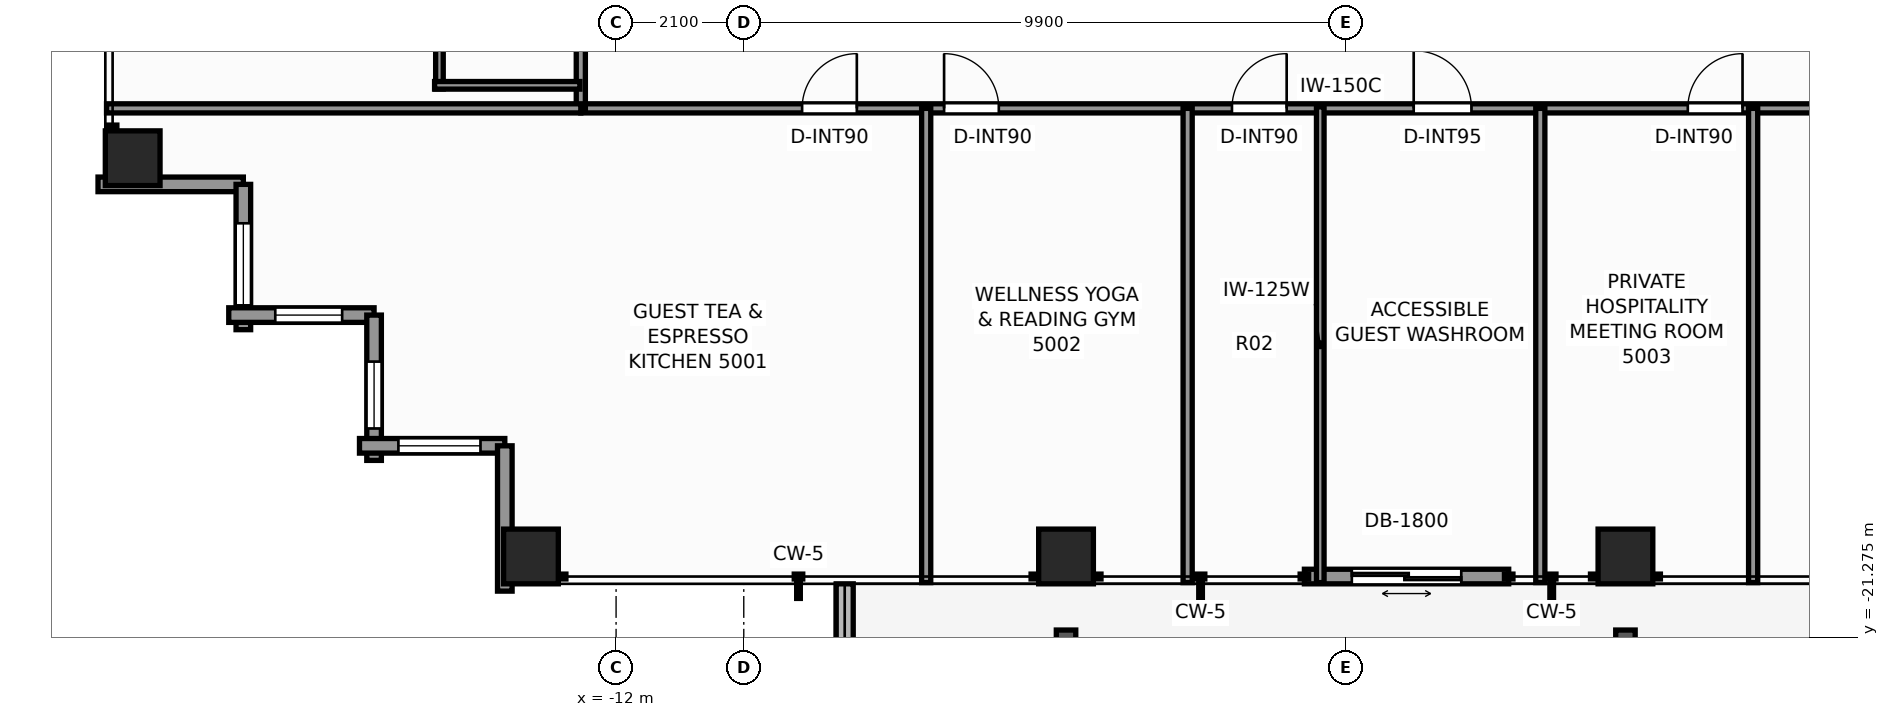
"""IFC4 building model, lengths in metres.
Left out: names, types, materials, properties, quantities, classifications, styles, units other than length and angle.
Written with IfcOpenShell. Run it as: python <this file> out.ifc"""

import sys

from ifc_helpers import new_model, si_unit, direction, frame, frame_2d, origin, origin_2d, place, context, subcontext, project, spatial, rectangle, extrude, element, fill, save


model = new_model("IFC4")
c1 = context("Model", 3, precision=1e-05, world=origin(), true_north=direction((0.0, 1.0)))
c2 = subcontext(c1, "Body", "Model", "MODEL_VIEW")
j1 = project(units=[si_unit("LENGTHUNIT", "METRE"), si_unit("PLANEANGLEUNIT", "RADIAN")], contexts=[c1])
p1 = place(None, origin())
s1 = spatial("IfcSite", under=j1, at=p1, CompositionType="ELEMENT")
p2 = place(p1, origin())
s2 = spatial("IfcBuilding", under=s1, at=p2, CompositionType="ELEMENT")
p3 = place(p2, frame((0.0, 0.0, 173.4)))
s3 = spatial("IfcBuildingStorey", under=s2, at=p3, CompositionType="ELEMENT", Elevation=173.4)
for number, where, z_axis, x_axis in (
    (1, (-13.4, -19.95, 0.0), (0.0, 0.0, 1.0), (1.0, 0.0, 0.0)),
    (2, (-4.6, -19.95, 0.0), (0.0, 0.0, 1.0), (1.0, 0.0, 0.0)),
    (3, (4.6, -19.95, 0.0), (0.0, 0.0, 1.0), (1.0, 0.0, 0.0)),
    (4, (-19.95, -13.4, 0.0), (0.0, 0.0, 1.0), (1.0, 0.0, 0.0)),
):
    element("IfcColumn", number, at=place(p3, frame(where, z_axis=z_axis, x_axis=x_axis)), inside=s3, PredefinedType="COLUMN", context=c2, shape_type="SweptSolid", body=[
        extrude(rectangle(XDim=0.9, YDim=0.9, at=origin_2d()), origin(), (0.0, 0.0, 1.0), 3.3),
    ])
p4 = place(p3, frame((-8.24, -20.4, -0.04), z_axis=(0.0, 0.0, 1.0), x_axis=(0.0, -1.0, 0.0)))
e5 = element("IfcWall", 5, at=p4, inside=s3, PredefinedType="PARAPET", context=c2, shape_type="SweptSolid", body=[
    extrude(rectangle(XDim=3.42, YDim=0.28, at=frame_2d((1.71, 0.0))), origin(), (0.0, 0.0, 1.0), 0.42),
])
p5 = place(p3, frame((2.68, -20.28, 0.0), z_axis=(0.0, 0.0, 1.0), x_axis=(-1.0, 0.0, 0.0)))
e6 = element("IfcWall", 6, at=p5, inside=s3, PredefinedType="STANDARD", context=c2, shape_type="SweptSolid", body=[
    extrude(rectangle(XDim=3.36, YDim=0.24, at=frame_2d((1.68, 0.0))), origin(), (0.0, 0.0, 1.0), 3.08),
])
p6 = place(p5, frame((0.78, 0.0, 0.0)))
e7 = element("IfcOpeningElement", 7, at=p6, cuts=e6, PredefinedType="OPENING", context=c2, shape_type="SweptSolid", body=[
    extrude(rectangle(XDim=1.8, YDim=2.2, at=frame_2d((0.9, 1.1))), frame((0.0, 0.13, 0.0), z_axis=(0.0, -1.0, 0.0), x_axis=(1.0, 0.0, 0.0)), (0.0, 0.0, 1.0), 0.26),
])
p7 = place(p3, frame((-18.13, -13.83, 0.0), z_axis=(0.0, 0.0, 1.0), x_axis=(-1.0, 0.0, 0.0)))
e8 = element("IfcWall", 8, at=p7, inside=s3, PredefinedType="STANDARD", context=c2, shape_type="SweptSolid", body=[
    extrude(rectangle(XDim=2.39, YDim=0.24, at=frame_2d((1.195, 0.0))), origin(), (0.0, 0.0, 1.0), 2.463),
])
p8 = place(p3, frame((-18.13, -16.22, 0.0), z_axis=(0.0, 0.0, 1.0), x_axis=(0.0, 1.0, 0.0)))
e9 = element("IfcWall", 9, at=p8, inside=s3, PredefinedType="STANDARD", context=c2, shape_type="SweptSolid", body=[
    extrude(rectangle(XDim=2.39, YDim=0.24, at=frame_2d((1.195, 0.0))), origin(), (0.0, 0.0, 1.0), 2.463),
])
p9 = place(p8, frame((0.4, 0.0, 0.65)))
e10 = element("IfcOpeningElement", 10, at=p9, cuts=e9, PredefinedType="OPENING", context=c2, shape_type="SweptSolid", body=[
    extrude(rectangle(XDim=1.35, YDim=1.55, at=frame_2d((0.675, 0.775))), frame((0.0, 0.13, 0.0), z_axis=(0.0, -1.0, 0.0), x_axis=(1.0, 0.0, 0.0)), (0.0, 0.0, 1.0), 0.26),
])
p10 = place(p3, frame((-15.98, -15.98, 0.0), z_axis=(0.0, 0.0, 1.0), x_axis=(-1.0, 0.0, 0.0)))
e11 = element("IfcWall", 11, at=p10, inside=s3, PredefinedType="STANDARD", context=c2, shape_type="SweptSolid", body=[
    extrude(rectangle(XDim=2.39, YDim=0.24, at=frame_2d((1.195, 0.0))), origin(), (0.0, 0.0, 1.0), 2.463),
])
p11 = place(p10, frame((0.525, 0.0, 0.65)))
e12 = element("IfcOpeningElement", 12, at=p11, cuts=e11, PredefinedType="OPENING", context=c2, shape_type="SweptSolid", body=[
    extrude(rectangle(XDim=1.1, YDim=1.45, at=frame_2d((0.55, 0.725))), frame((0.0, 0.13, 0.0), z_axis=(0.0, -1.0, 0.0), x_axis=(1.0, 0.0, 0.0)), (0.0, 0.0, 1.0), 0.26),
])
p12 = place(p3, frame((-15.98, -18.37, 0.0), z_axis=(0.0, 0.0, 1.0), x_axis=(0.0, 1.0, 0.0)))
e13 = element("IfcWall", 13, at=p12, inside=s3, PredefinedType="STANDARD", context=c2, shape_type="SweptSolid", body=[
    extrude(rectangle(XDim=2.39, YDim=0.24, at=frame_2d((1.195, 0.0))), origin(), (0.0, 0.0, 1.0), 2.463),
])
p13 = place(p12, frame((0.525, 0.0, 0.65)))
e14 = element("IfcOpeningElement", 14, at=p13, cuts=e13, PredefinedType="OPENING", context=c2, shape_type="SweptSolid", body=[
    extrude(rectangle(XDim=1.1, YDim=1.45, at=frame_2d((0.55, 0.725))), frame((0.0, 0.13, 0.0), z_axis=(0.0, -1.0, 0.0), x_axis=(1.0, 0.0, 0.0)), (0.0, 0.0, 1.0), 0.26),
])
p14 = place(p3, frame((-13.83, -18.13, 0.0), z_axis=(0.0, 0.0, 1.0), x_axis=(-1.0, 0.0, 0.0)))
e15 = element("IfcWall", 15, at=p14, inside=s3, PredefinedType="STANDARD", context=c2, shape_type="SweptSolid", body=[
    extrude(rectangle(XDim=2.39, YDim=0.24, at=frame_2d((1.195, 0.0))), origin(), (0.0, 0.0, 1.0), 2.463),
])
p15 = place(p14, frame((0.4, 0.0, 0.65)))
e16 = element("IfcOpeningElement", 16, at=p15, cuts=e15, PredefinedType="OPENING", context=c2, shape_type="SweptSolid", body=[
    extrude(rectangle(XDim=1.35, YDim=1.55, at=frame_2d((0.675, 0.775))), frame((0.0, 0.13, 0.0), z_axis=(0.0, -1.0, 0.0), x_axis=(1.0, 0.0, 0.0)), (0.0, 0.0, 1.0), 0.26),
])
p16 = place(p3, frame((-13.83, -20.52, 0.0), z_axis=(0.0, 0.0, 1.0), x_axis=(0.0, 1.0, 0.0)))
e17 = element("IfcWall", 17, at=p16, inside=s3, PredefinedType="STANDARD", context=c2, shape_type="SweptSolid", body=[
    extrude(rectangle(XDim=2.39, YDim=0.24, at=frame_2d((1.195, 0.0))), origin(), (0.0, 0.0, 1.0), 2.463),
])
p17 = place(p3, frame((-12.58, -12.58, 0.0), z_axis=(0.0, 0.0, 1.0), x_axis=(1.0, 0.0, 0.0)))
e18 = element("IfcWall", 18, at=p17, inside=s3, PredefinedType="PARTITIONING", context=c2, shape_type="SweptSolid", body=[
    extrude(rectangle(XDim=25.0, YDim=0.15, at=frame_2d((12.5, 0.0))), origin(), (0.0, 0.0, 1.0), 2.369),
])
p18 = place(p17, frame((3.639, 0.0, 0.0)))
e19 = element("IfcOpeningElement", 19, at=p18, cuts=e18, PredefinedType="OPENING", context=c2, shape_type="SweptSolid", body=[
    extrude(rectangle(XDim=0.9, YDim=2.06, at=frame_2d((0.45, 1.03))), frame((0.0, 0.085, 0.0), z_axis=(0.0, -1.0, 0.0), x_axis=(1.0, 0.0, 0.0)), (0.0, 0.0, 1.0), 0.17),
])
p19 = place(p17, frame((5.974, 0.0, 0.0)))
e20 = element("IfcOpeningElement", 20, at=p19, cuts=e18, PredefinedType="OPENING", context=c2, shape_type="SweptSolid", body=[
    extrude(rectangle(XDim=0.9, YDim=2.06, at=frame_2d((0.45, 1.03))), frame((0.0, 0.085, 0.0), z_axis=(0.0, -1.0, 0.0), x_axis=(1.0, 0.0, 0.0)), (0.0, 0.0, 1.0), 0.17),
])
p20 = place(p17, frame((10.708, 0.0, 0.0)))
e21 = element("IfcOpeningElement", 21, at=p20, cuts=e18, PredefinedType="OPENING", context=c2, shape_type="SweptSolid", body=[
    extrude(rectangle(XDim=0.9, YDim=2.06, at=frame_2d((0.45, 1.03))), frame((0.0, 0.085, 0.0), z_axis=(0.0, -1.0, 0.0), x_axis=(1.0, 0.0, 0.0)), (0.0, 0.0, 1.0), 0.17),
])
p21 = place(p17, frame((13.698, 0.0, 0.0)))
e22 = element("IfcOpeningElement", 22, at=p21, cuts=e18, PredefinedType="OPENING", context=c2, shape_type="SweptSolid", body=[
    extrude(rectangle(XDim=0.95, YDim=2.06, at=frame_2d((0.475, 1.03))), frame((0.0, 0.085, 0.0), z_axis=(0.0, -1.0, 0.0), x_axis=(1.0, 0.0, 0.0)), (0.0, 0.0, 1.0), 0.17),
])
p22 = place(p17, frame((18.206, 0.0, 0.0)))
e23 = element("IfcOpeningElement", 23, at=p22, cuts=e18, PredefinedType="OPENING", context=c2, shape_type="SweptSolid", body=[
    extrude(rectangle(XDim=0.9, YDim=2.06, at=frame_2d((0.45, 1.03))), frame((0.0, 0.085, 0.0), z_axis=(0.0, -1.0, 0.0), x_axis=(1.0, 0.0, 0.0)), (0.0, 0.0, 1.0), 0.17),
])
p23 = place(p17, frame((20.541, 0.0, 0.0)))
e24 = element("IfcOpeningElement", 24, at=p23, cuts=e18, PredefinedType="OPENING", context=c2, shape_type="SweptSolid", body=[
    extrude(rectangle(XDim=0.9, YDim=2.06, at=frame_2d((0.45, 1.03))), frame((0.0, 0.085, 0.0), z_axis=(0.0, -1.0, 0.0), x_axis=(1.0, 0.0, 0.0)), (0.0, 0.0, 1.0), 0.17),
])
p24 = place(p3, frame((-12.58, -12.58, 0.0), z_axis=(0.0, 0.0, 1.0), x_axis=(0.0, 1.0, 0.0)))
e25 = element("IfcWall", 25, at=p24, inside=s3, PredefinedType="PARTITIONING", context=c2, shape_type="SweptSolid", body=[
    extrude(rectangle(XDim=24.84, YDim=0.15, at=frame_2d((12.42, 0.0))), origin(), (0.0, 0.0, 1.0), 2.369),
])
p25 = place(p24, frame((3.831, 0.0, 0.0)))
e26 = element("IfcOpeningElement", 26, at=p25, cuts=e25, PredefinedType="OPENING", context=c2, shape_type="SweptSolid", body=[
    extrude(rectangle(XDim=0.95, YDim=2.06, at=frame_2d((0.475, 1.03))), frame((0.0, 0.085, 0.0), z_axis=(0.0, -1.0, 0.0), x_axis=(1.0, 0.0, 0.0)), (0.0, 0.0, 1.0), 0.17),
])
p26 = place(p24, frame((9.378, 0.0, 0.0)))
e27 = element("IfcOpeningElement", 27, at=p26, cuts=e25, PredefinedType="OPENING", context=c2, shape_type="SweptSolid", body=[
    extrude(rectangle(XDim=0.95, YDim=2.06, at=frame_2d((0.475, 1.03))), frame((0.0, 0.085, 0.0), z_axis=(0.0, -1.0, 0.0), x_axis=(1.0, 0.0, 0.0)), (0.0, 0.0, 1.0), 0.17),
])
p27 = place(p24, frame((14.903, 0.0, 0.0)))
e28 = element("IfcOpeningElement", 28, at=p27, cuts=e25, PredefinedType="OPENING", context=c2, shape_type="SweptSolid", body=[
    extrude(rectangle(XDim=0.95, YDim=2.06, at=frame_2d((0.475, 1.03))), frame((0.0, 0.085, 0.0), z_axis=(0.0, -1.0, 0.0), x_axis=(1.0, 0.0, 0.0)), (0.0, 0.0, 1.0), 0.17),
])
p28 = place(p24, frame((19.246, 0.0, 0.0)))
e29 = element("IfcOpeningElement", 29, at=p28, cuts=e25, PredefinedType="OPENING", context=c2, shape_type="SweptSolid", body=[
    extrude(rectangle(XDim=0.95, YDim=2.06, at=frame_2d((0.475, 1.03))), frame((0.0, 0.085, 0.0), z_axis=(0.0, -1.0, 0.0), x_axis=(1.0, 0.0, 0.0)), (0.0, 0.0, 1.0), 0.17),
])
p29 = place(p3, frame((-20.38, -12.58, 0.0), z_axis=(0.0, 0.0, 1.0), x_axis=(1.0, 0.0, 0.0)))
e30 = element("IfcWall", 30, at=p29, inside=s3, PredefinedType="PARTITIONING", context=c2, shape_type="SweptSolid", body=[
    extrude(rectangle(XDim=7.8, YDim=0.15, at=frame_2d((3.9, 0.0))), origin(), (0.0, 0.0, 1.0), 2.369),
])
for number, where, z_axis, x_axis in (
    (31, (-6.9, -20.38, 0.0), (0.0, 0.0, 1.0), (0.0, 1.0, 0.0)),
    (32, (-2.6, -20.38, 0.0), (0.0, 0.0, 1.0), (0.0, 1.0, 0.0)),
    (33, (3.2, -20.38, 0.0), (0.0, 0.0, 1.0), (0.0, 1.0, 0.0)),
):
    element("IfcWall", number, at=place(p3, frame(where, z_axis=z_axis, x_axis=x_axis)), inside=s3, PredefinedType="PARTITIONING", context=c2, shape_type="SweptSolid", body=[
        extrude(rectangle(XDim=7.8, YDim=0.15, at=frame_2d((3.9, 0.0))), origin(), (0.0, 0.0, 1.0), 2.453),
    ])
p30 = place(p3, frame((-0.419, -20.38, 0.0), z_axis=(0.0, 0.0, 1.0), x_axis=(0.0, 1.0, 0.0)))
e34 = element("IfcWall", 34, at=p30, inside=s3, PredefinedType="PARTITIONING", context=c2, shape_type="SweptSolid", body=[
    extrude(rectangle(XDim=7.825, YDim=0.125, at=frame_2d((3.913, 0.0))), origin(), (0.0, 0.0, 1.0), 2.453),
])
p31 = place(p3, frame((6.7, -20.38, 0.0), z_axis=(0.0, 0.0, 1.0), x_axis=(0.0, 1.0, 0.0)))
e35 = element("IfcWall", 35, at=p31, inside=s3, PredefinedType="PARTITIONING", context=c2, shape_type="SweptSolid", body=[
    extrude(rectangle(XDim=7.8, YDim=0.15, at=frame_2d((3.9, 0.0))), origin(), (0.0, 0.0, 1.0), 2.453),
])
p32 = place(p3, frame((-14.905, -12.261, 0.0), z_axis=(0.0, 0.0, 1.0), x_axis=(0.0, 1.0, 0.0)))
e36 = element("IfcWall", 36, at=p32, inside=s3, PredefinedType="PARTITIONING", context=c2, shape_type="SweptSolid", body=[
    extrude(rectangle(XDim=2.77, YDim=0.125, at=frame_2d((1.385, 0.0))), origin(), (0.0, 0.0, 1.0), 2.369),
])
p33 = place(p3, frame((-14.985, -12.201, 0.0), z_axis=(0.0, 0.0, 1.0), x_axis=(1.0, 0.0, 0.0)))
e37 = element("IfcWall", 37, at=p33, inside=s3, PredefinedType="PARTITIONING", context=c2, shape_type="SweptSolid", body=[
    extrude(rectangle(XDim=2.39, YDim=0.125, at=frame_2d((1.195, 0.0))), origin(), (0.0, 0.0, 1.0), 3.08),
])
p34 = place(p6, origin())
e38 = element("IfcDoor", 38, at=p34, inside=s3, OperationType="DOUBLE_DOOR_SLIDING", PredefinedType="DOOR", context=c2, shape_type="SweptSolid", body=[
    extrude(rectangle(XDim=1.8, YDim=2.2, at=frame_2d((0.9, 1.1))), frame((0.0, 0.025, 0.0), z_axis=(0.0, -1.0, 0.0), x_axis=(1.0, 0.0, 0.0)), (0.0, 0.0, 1.0), 0.05),
])
fill(e7, e38)
p35 = place(p9, origin())
e39 = element("IfcWindow", 39, at=p35, inside=s3, PartitioningType="SINGLE_PANEL", PredefinedType="WINDOW", context=c2, shape_type="SweptSolid", body=[
    extrude(rectangle(XDim=1.35, YDim=1.55, at=frame_2d((0.675, 0.775))), frame((0.0, 0.03, 0.0), z_axis=(0.0, -1.0, 0.0), x_axis=(1.0, 0.0, 0.0)), (0.0, 0.0, 1.0), 0.06),
])
fill(e10, e39)
p36 = place(p11, origin())
e40 = element("IfcWindow", 40, at=p36, inside=s3, PartitioningType="SINGLE_PANEL", PredefinedType="WINDOW", context=c2, shape_type="SweptSolid", body=[
    extrude(rectangle(XDim=1.1, YDim=1.45, at=frame_2d((0.55, 0.725))), frame((0.0, 0.03, 0.0), z_axis=(0.0, -1.0, 0.0), x_axis=(1.0, 0.0, 0.0)), (0.0, 0.0, 1.0), 0.06),
])
fill(e12, e40)
p37 = place(p13, origin())
e41 = element("IfcWindow", 41, at=p37, inside=s3, PartitioningType="SINGLE_PANEL", PredefinedType="WINDOW", context=c2, shape_type="SweptSolid", body=[
    extrude(rectangle(XDim=1.1, YDim=1.45, at=frame_2d((0.55, 0.725))), frame((0.0, 0.03, 0.0), z_axis=(0.0, -1.0, 0.0), x_axis=(1.0, 0.0, 0.0)), (0.0, 0.0, 1.0), 0.06),
])
fill(e14, e41)
p38 = place(p15, origin())
e42 = element("IfcWindow", 42, at=p38, inside=s3, PartitioningType="SINGLE_PANEL", PredefinedType="WINDOW", context=c2, shape_type="SweptSolid", body=[
    extrude(rectangle(XDim=1.35, YDim=1.55, at=frame_2d((0.675, 0.775))), frame((0.0, 0.03, 0.0), z_axis=(0.0, -1.0, 0.0), x_axis=(1.0, 0.0, 0.0)), (0.0, 0.0, 1.0), 0.06),
])
fill(e16, e42)
p39 = place(p18, origin())
e43 = element("IfcDoor", 43, at=p39, inside=s3, OperationType="SINGLE_SWING_RIGHT", PredefinedType="DOOR", context=c2, shape_type="SweptSolid", body=[
    extrude(rectangle(XDim=0.9, YDim=2.06, at=frame_2d((0.45, 1.03))), frame((0.0, 0.025, 0.0), z_axis=(0.0, -1.0, 0.0), x_axis=(1.0, 0.0, 0.0)), (0.0, 0.0, 1.0), 0.05),
])
fill(e19, e43)
p40 = place(p19, origin())
e44 = element("IfcDoor", 44, at=p40, inside=s3, OperationType="SINGLE_SWING_LEFT", PredefinedType="DOOR", context=c2, shape_type="SweptSolid", body=[
    extrude(rectangle(XDim=0.9, YDim=2.06, at=frame_2d((0.45, 1.03))), frame((0.0, 0.025, 0.0), z_axis=(0.0, -1.0, 0.0), x_axis=(1.0, 0.0, 0.0)), (0.0, 0.0, 1.0), 0.05),
])
fill(e20, e44)
p41 = place(p20, origin())
e45 = element("IfcDoor", 45, at=p41, inside=s3, OperationType="SINGLE_SWING_RIGHT", PredefinedType="DOOR", context=c2, shape_type="SweptSolid", body=[
    extrude(rectangle(XDim=0.9, YDim=2.06, at=frame_2d((0.45, 1.03))), frame((0.0, 0.025, 0.0), z_axis=(0.0, -1.0, 0.0), x_axis=(1.0, 0.0, 0.0)), (0.0, 0.0, 1.0), 0.05),
])
fill(e21, e45)
p42 = place(p21, origin())
e46 = element("IfcDoor", 46, at=p42, inside=s3, OperationType="SINGLE_SWING_LEFT", PredefinedType="DOOR", context=c2, shape_type="SweptSolid", body=[
    extrude(rectangle(XDim=0.95, YDim=2.06, at=frame_2d((0.475, 1.03))), frame((0.0, 0.025, 0.0), z_axis=(0.0, -1.0, 0.0), x_axis=(1.0, 0.0, 0.0)), (0.0, 0.0, 1.0), 0.05),
])
fill(e22, e46)
p43 = place(p22, origin())
e47 = element("IfcDoor", 47, at=p43, inside=s3, OperationType="SINGLE_SWING_RIGHT", PredefinedType="DOOR", context=c2, shape_type="SweptSolid", body=[
    extrude(rectangle(XDim=0.9, YDim=2.06, at=frame_2d((0.45, 1.03))), frame((0.0, 0.025, 0.0), z_axis=(0.0, -1.0, 0.0), x_axis=(1.0, 0.0, 0.0)), (0.0, 0.0, 1.0), 0.05),
])
fill(e23, e47)
save(model, sys.argv[1])
